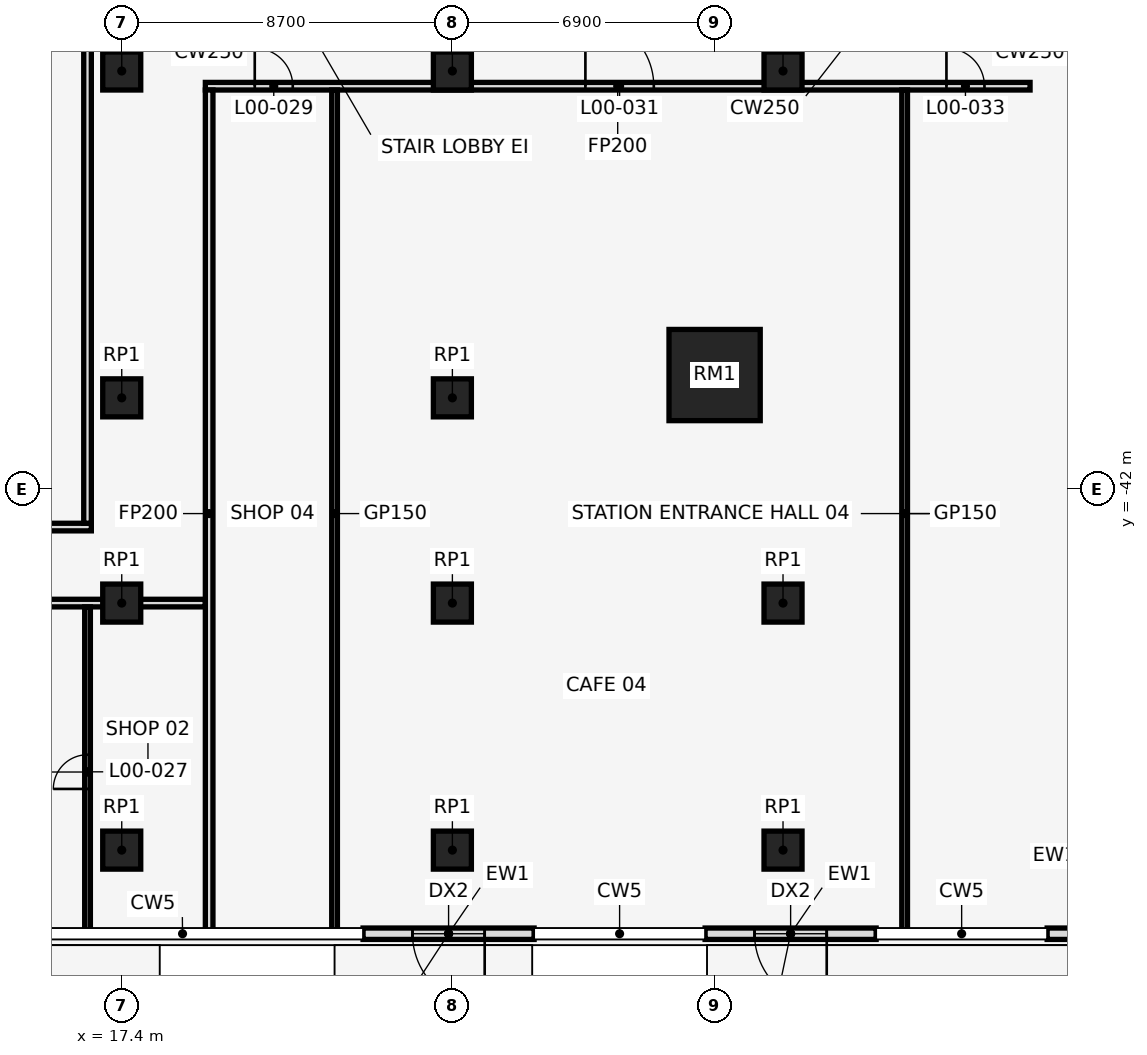
"""IFC4 building model, lengths in metres.
Left out: names, types, materials, properties, quantities, classifications, styles, units other than length and angle.
Written with IfcOpenShell. Run it as: python <this file> out.ifc"""

import sys

from ifc_helpers import new_model, si_unit, direction, frame, frame_2d, origin, origin_2d, place, context, subcontext, project, spatial, rectangle, extrude, element, fill, save


model = new_model("IFC4")
c1 = context("Model", 3, precision=1e-05, world=origin(), true_north=direction((0.0, 1.0)))
c2 = subcontext(c1, "Body", "Model", "MODEL_VIEW")
j1 = project(units=[si_unit("LENGTHUNIT", "METRE"), si_unit("PLANEANGLEUNIT", "RADIAN")], contexts=[c1])
p1 = place(None, origin())
s1 = spatial("IfcSite", under=j1, at=p1, CompositionType="ELEMENT")
p2 = place(p1, origin())
s2 = spatial("IfcBuilding", under=s1, at=p2, CompositionType="ELEMENT")
p3 = place(p2, origin())
s3 = spatial("IfcBuildingStorey", under=s2, at=p3, CompositionType="ELEMENT", Elevation=0.0)
for number, where, z_axis, x_axis in (
    (1, (17.4, -39.6, 0.0), (0.0, 0.0, 1.0), (1.0, 0.0, 0.0)),
    (2, (26.1, -39.6, 0.0), (0.0, 0.0, 1.0), (1.0, 0.0, 0.0)),
):
    element("IfcColumn", number, at=place(p3, frame(where, z_axis=z_axis, x_axis=x_axis)), inside=s3, PredefinedType="COLUMN", context=c2, shape_type="SweptSolid", body=[
        extrude(rectangle(XDim=1.0, YDim=1.0, at=origin_2d()), origin(), (0.0, 0.0, 1.0), 8.0),
    ])
p4 = place(p3, frame((33.0, -39.0, 0.0), z_axis=(0.0, 0.0, 1.0), x_axis=(1.0, 0.0, 0.0)))
e3 = element("IfcColumn", 3, at=p4, inside=s3, PredefinedType="COLUMN", context=c2, shape_type="SweptSolid", body=[
    extrude(rectangle(XDim=2.4, YDim=2.4, at=origin_2d()), origin(), (0.0, 0.0, 1.0), 8.0),
])
for number, where, z_axis, x_axis in (
    (4, (17.4, -31.0, 0.0), (0.0, 0.0, 1.0), (1.0, 0.0, 0.0)),
    (5, (17.4, -45.0, 0.0), (0.0, 0.0, 1.0), (1.0, 0.0, 0.0)),
    (6, (17.4, -51.5, 0.0), (0.0, 0.0, 1.0), (1.0, 0.0, 0.0)),
    (7, (26.1, -31.0, 0.0), (0.0, 0.0, 1.0), (1.0, 0.0, 0.0)),
    (8, (26.1, -45.0, 0.0), (0.0, 0.0, 1.0), (1.0, 0.0, 0.0)),
    (9, (26.1, -51.5, 0.0), (0.0, 0.0, 1.0), (1.0, 0.0, 0.0)),
    (10, (34.8, -31.0, 0.0), (0.0, 0.0, 1.0), (1.0, 0.0, 0.0)),
    (11, (34.8, -45.0, 0.0), (0.0, 0.0, 1.0), (1.0, 0.0, 0.0)),
    (12, (34.8, -51.5, 0.0), (0.0, 0.0, 1.0), (1.0, 0.0, 0.0)),
):
    element("IfcColumn", number, at=place(p3, frame(where, z_axis=z_axis, x_axis=x_axis)), inside=s3, PredefinedType="COLUMN", context=c2, shape_type="SweptSolid", body=[
        extrude(rectangle(XDim=1.0, YDim=1.0, at=origin_2d()), origin(), (0.0, 0.0, 1.0), 8.0),
    ])
p5 = place(p3, frame((28.25, -53.7, 0.0), z_axis=(0.0, 0.0, 1.0), x_axis=(-1.0, 0.0, 0.0)))
e13 = element("IfcWall", 13, at=p5, inside=s3, PredefinedType="STANDARD", context=c2, shape_type="SweptSolid", body=[
    extrude(rectangle(XDim=4.5, YDim=0.3, at=frame_2d((2.25, 0.0))), origin(), (0.0, 0.0, 1.0), 7.7),
])
p6 = place(p5, frame((1.3, 0.0, 0.0)))
e14 = element("IfcOpeningElement", 14, at=p6, cuts=e13, PredefinedType="OPENING", context=c2, shape_type="SweptSolid", body=[
    extrude(rectangle(XDim=1.9, YDim=2.6, at=frame_2d((0.95, 1.3))), frame((0.0, 0.162, 0.0), z_axis=(0.0, -1.0, 0.0), x_axis=(1.0, 0.0, 0.0)), (0.0, 0.0, 1.0), 0.324),
])
p7 = place(p5, frame((1.3, 0.0, 3.3)))
e15 = element("IfcOpeningElement", 15, at=p7, cuts=e13, PredefinedType="OPENING", context=c2, shape_type="SweptSolid", body=[
    extrude(rectangle(XDim=1.9, YDim=3.0, at=frame_2d((0.95, 1.5))), frame((0.0, 0.162, 0.0), z_axis=(0.0, -1.0, 0.0), x_axis=(1.0, 0.0, 0.0)), (0.0, 0.0, 1.0), 0.324),
])
p8 = place(p3, frame((37.25, -53.7, 0.0), z_axis=(0.0, 0.0, 1.0), x_axis=(-1.0, 0.0, 0.0)))
e16 = element("IfcWall", 16, at=p8, inside=s3, PredefinedType="STANDARD", context=c2, shape_type="SweptSolid", body=[
    extrude(rectangle(XDim=4.5, YDim=0.3, at=frame_2d((2.25, 0.0))), origin(), (0.0, 0.0, 1.0), 7.7),
])
p9 = place(p8, frame((1.3, 0.0, 0.0)))
e17 = element("IfcOpeningElement", 17, at=p9, cuts=e16, PredefinedType="OPENING", context=c2, shape_type="SweptSolid", body=[
    extrude(rectangle(XDim=1.9, YDim=2.6, at=frame_2d((0.95, 1.3))), frame((0.0, 0.162, 0.0), z_axis=(0.0, -1.0, 0.0), x_axis=(1.0, 0.0, 0.0)), (0.0, 0.0, 1.0), 0.324),
])
p10 = place(p8, frame((1.3, 0.0, 3.3)))
e18 = element("IfcOpeningElement", 18, at=p10, cuts=e16, PredefinedType="OPENING", context=c2, shape_type="SweptSolid", body=[
    extrude(rectangle(XDim=1.9, YDim=3.0, at=frame_2d((0.95, 1.5))), frame((0.0, 0.162, 0.0), z_axis=(0.0, -1.0, 0.0), x_axis=(1.0, 0.0, 0.0)), (0.0, 0.0, 1.0), 0.324),
])
p11 = place(p3, frame((46.25, -53.7, 0.0), z_axis=(0.0, 0.0, 1.0), x_axis=(-1.0, 0.0, 0.0)))
e19 = element("IfcWall", 19, at=p11, inside=s3, PredefinedType="STANDARD", context=c2, shape_type="SweptSolid", body=[
    extrude(rectangle(XDim=4.5, YDim=0.3, at=frame_2d((2.25, 0.0))), origin(), (0.0, 0.0, 1.0), 7.7),
])
p12 = place(p11, frame((1.3, 0.0, 0.0)))
e20 = element("IfcOpeningElement", 20, at=p12, cuts=e19, PredefinedType="OPENING", context=c2, shape_type="SweptSolid", body=[
    extrude(rectangle(XDim=1.9, YDim=2.6, at=frame_2d((0.95, 1.3))), frame((0.0, 0.162, 0.0), z_axis=(0.0, -1.0, 0.0), x_axis=(1.0, 0.0, 0.0)), (0.0, 0.0, 1.0), 0.324),
])
p13 = place(p11, frame((1.3, 0.0, 3.3)))
e21 = element("IfcOpeningElement", 21, at=p13, cuts=e19, PredefinedType="OPENING", context=c2, shape_type="SweptSolid", body=[
    extrude(rectangle(XDim=1.9, YDim=3.0, at=frame_2d((0.95, 1.5))), frame((0.0, 0.162, 0.0), z_axis=(0.0, -1.0, 0.0), x_axis=(1.0, 0.0, 0.0)), (0.0, 0.0, 1.0), 0.324),
])
p14 = place(p3, frame((-16.5, -45.0, 0.0), z_axis=(0.0, 0.0, 1.0), x_axis=(1.0, 0.0, 0.0)))
e22 = element("IfcWall", 22, at=p14, inside=s3, PredefinedType="PARTITIONING", context=c2, shape_type="SweptSolid", body=[
    extrude(rectangle(XDim=36.1, YDim=0.2, at=frame_2d((18.05, 0.0))), origin(), (0.0, 0.0, 1.0), 7.7),
])
p15 = place(p14, frame((3.0, 0.0, 0.0)))
e23 = element("IfcOpeningElement", 23, at=p15, cuts=e22, PredefinedType="OPENING", context=c2, shape_type="SweptSolid", body=[
    extrude(rectangle(XDim=1.0, YDim=2.1, at=frame_2d((0.5, 1.05))), frame((0.0, 0.112, 0.0), z_axis=(0.0, -1.0, 0.0), x_axis=(1.0, 0.0, 0.0)), (0.0, 0.0, 1.0), 0.224),
])
p16 = place(p3, frame((-16.6, -43.0, 0.0), z_axis=(0.0, 0.0, 1.0), x_axis=(1.0, 0.0, 0.0)))
e24 = element("IfcWall", 24, at=p16, inside=s3, PredefinedType="PARTITIONING", context=c2, shape_type="SweptSolid", body=[
    extrude(rectangle(XDim=33.2, YDim=0.2, at=frame_2d((16.6, 0.0))), origin(), (0.0, 0.0, 1.0), 7.7),
])
p17 = place(p3, frame((19.6, -31.4, 0.0), z_axis=(0.0, 0.0, 1.0), x_axis=(1.0, 0.0, 0.0)))
e25 = element("IfcWall", 25, at=p17, inside=s3, PredefinedType="PARTITIONING", context=c2, shape_type="SweptSolid", body=[
    extrude(rectangle(XDim=21.7, YDim=0.2, at=frame_2d((10.85, 0.0))), origin(), (0.0, 0.0, 1.0), 7.7),
])
p18 = place(p17, frame((1.3, 0.0, 0.0)))
e26 = element("IfcOpeningElement", 26, at=p18, cuts=e25, PredefinedType="OPENING", context=c2, shape_type="SweptSolid", body=[
    extrude(rectangle(XDim=1.0, YDim=2.1, at=frame_2d((0.5, 1.05))), frame((0.0, 0.112, 0.0), z_axis=(0.0, -1.0, 0.0), x_axis=(1.0, 0.0, 0.0)), (0.0, 0.0, 1.0), 0.224),
])
p19 = place(p17, frame((10.0, 0.0, 0.0)))
e27 = element("IfcOpeningElement", 27, at=p19, cuts=e25, PredefinedType="OPENING", context=c2, shape_type="SweptSolid", body=[
    extrude(rectangle(XDim=1.8, YDim=2.1, at=frame_2d((0.9, 1.05))), frame((0.0, 0.112, 0.0), z_axis=(0.0, -1.0, 0.0), x_axis=(1.0, 0.0, 0.0)), (0.0, 0.0, 1.0), 0.224),
])
p20 = place(p17, frame((19.5, 0.0, 0.0)))
e28 = element("IfcOpeningElement", 28, at=p20, cuts=e25, PredefinedType="OPENING", context=c2, shape_type="SweptSolid", body=[
    extrude(rectangle(XDim=1.0, YDim=2.1, at=frame_2d((0.5, 1.05))), frame((0.0, 0.112, 0.0), z_axis=(0.0, -1.0, 0.0), x_axis=(1.0, 0.0, 0.0)), (0.0, 0.0, 1.0), 0.224),
])
p21 = place(p3, frame((16.5, -53.79, 0.0), z_axis=(0.0, 0.0, 1.0), x_axis=(0.0, 1.0, 0.0)))
e29 = element("IfcWall", 29, at=p21, inside=s3, PredefinedType="PARTITIONING", context=c2, shape_type="SweptSolid", body=[
    extrude(rectangle(XDim=8.69, YDim=0.15, at=frame_2d((4.345, 0.0))), origin(), (0.0, 0.0, 1.0), 7.7),
])
p22 = place(p21, frame((3.9, 0.0, 0.0)))
e30 = element("IfcOpeningElement", 30, at=p22, cuts=e29, PredefinedType="OPENING", context=c2, shape_type="SweptSolid", body=[
    extrude(rectangle(XDim=0.9, YDim=2.1, at=frame_2d((0.45, 1.05))), frame((0.0, 0.087, 0.0), z_axis=(0.0, -1.0, 0.0), x_axis=(1.0, 0.0, 0.0)), (0.0, 0.0, 1.0), 0.174),
])
p23 = place(p3, frame((16.5, -42.9, 0.0), z_axis=(0.0, 0.0, 1.0), x_axis=(0.0, 1.0, 0.0)))
e31 = element("IfcWall", 31, at=p23, inside=s3, PredefinedType="PARTITIONING", context=c2, shape_type="SweptSolid", body=[
    extrude(rectangle(XDim=27.4, YDim=0.2, at=frame_2d((13.7, 0.0))), origin(), (0.0, 0.0, 1.0), 7.7),
])
p24 = place(p3, frame((19.7, -53.79, 0.0), z_axis=(0.0, 0.0, 1.0), x_axis=(0.0, 1.0, 0.0)))
e32 = element("IfcWall", 32, at=p24, inside=s3, PredefinedType="PARTITIONING", context=c2, shape_type="SweptSolid", body=[
    extrude(rectangle(XDim=22.29, YDim=0.2, at=frame_2d((11.145, 0.0))), origin(), (0.0, 0.0, 1.0), 7.7),
])
for number, where, z_axis, x_axis in (
    (33, (23.0, -53.79, 0.0), (0.0, 0.0, 1.0), (0.0, 1.0, 0.0)),
    (34, (38.0, -53.79, 0.0), (0.0, 0.0, 1.0), (0.0, 1.0, 0.0)),
):
    element("IfcWall", number, at=place(p3, frame(where, z_axis=z_axis, x_axis=x_axis)), inside=s3, PredefinedType="PARTITIONING", context=c2, shape_type="SweptSolid", body=[
        extrude(rectangle(XDim=22.29, YDim=0.15, at=frame_2d((11.145, 0.0))), origin(), (0.0, 0.0, 1.0), 7.7),
    ])
p25 = place(p6, origin())
e35 = element("IfcDoor", 35, at=p25, inside=s3, OperationType="SINGLE_SWING_LEFT", PredefinedType="DOOR", context=c2, shape_type="SweptSolid", body=[
    extrude(rectangle(XDim=1.9, YDim=2.6, at=frame_2d((0.95, 1.3))), frame((0.0, 0.025, 0.0), z_axis=(0.0, -1.0, 0.0), x_axis=(1.0, 0.0, 0.0)), (0.0, 0.0, 1.0), 0.05),
])
fill(e14, e35)
p26 = place(p7, origin())
e36 = element("IfcWindow", 36, at=p26, inside=s3, PartitioningType="SINGLE_PANEL", PredefinedType="WINDOW", context=c2, shape_type="SweptSolid", body=[
    extrude(rectangle(XDim=1.9, YDim=3.0, at=frame_2d((0.95, 1.5))), frame((0.0, 0.03, 0.0), z_axis=(0.0, -1.0, 0.0), x_axis=(1.0, 0.0, 0.0)), (0.0, 0.0, 1.0), 0.06),
])
fill(e15, e36)
p27 = place(p9, origin())
e37 = element("IfcDoor", 37, at=p27, inside=s3, OperationType="SINGLE_SWING_LEFT", PredefinedType="DOOR", context=c2, shape_type="SweptSolid", body=[
    extrude(rectangle(XDim=1.9, YDim=2.6, at=frame_2d((0.95, 1.3))), frame((0.0, 0.025, 0.0), z_axis=(0.0, -1.0, 0.0), x_axis=(1.0, 0.0, 0.0)), (0.0, 0.0, 1.0), 0.05),
])
fill(e17, e37)
p28 = place(p10, origin())
e38 = element("IfcWindow", 38, at=p28, inside=s3, PartitioningType="SINGLE_PANEL", PredefinedType="WINDOW", context=c2, shape_type="SweptSolid", body=[
    extrude(rectangle(XDim=1.9, YDim=3.0, at=frame_2d((0.95, 1.5))), frame((0.0, 0.03, 0.0), z_axis=(0.0, -1.0, 0.0), x_axis=(1.0, 0.0, 0.0)), (0.0, 0.0, 1.0), 0.06),
])
fill(e18, e38)
p29 = place(p22, frame((0.9, 0.0, 0.0), z_axis=(0.0, 0.0, 1.0), x_axis=(-1.0, 0.0, 0.0)))
e39 = element("IfcDoor", 39, at=p29, inside=s3, OperationType="SINGLE_SWING_RIGHT", PredefinedType="DOOR", context=c2, shape_type="SweptSolid", body=[
    extrude(rectangle(XDim=0.9, YDim=2.1, at=frame_2d((0.45, 1.05))), frame((0.0, 0.025, 0.0), z_axis=(0.0, -1.0, 0.0), x_axis=(1.0, 0.0, 0.0)), (0.0, 0.0, 1.0), 0.05),
])
fill(e30, e39)
p30 = place(p18, frame((1.0, 0.0, 0.0), z_axis=(0.0, 0.0, 1.0), x_axis=(-1.0, 0.0, 0.0)))
e40 = element("IfcDoor", 40, at=p30, inside=s3, OperationType="SINGLE_SWING_RIGHT", PredefinedType="DOOR", context=c2, shape_type="SweptSolid", body=[
    extrude(rectangle(XDim=1.0, YDim=2.1, at=frame_2d((0.5, 1.05))), frame((0.0, 0.025, 0.0), z_axis=(0.0, -1.0, 0.0), x_axis=(1.0, 0.0, 0.0)), (0.0, 0.0, 1.0), 0.05),
])
fill(e26, e40)
p31 = place(p19, origin())
e41 = element("IfcDoor", 41, at=p31, inside=s3, OperationType="SINGLE_SWING_LEFT", PredefinedType="DOOR", context=c2, shape_type="SweptSolid", body=[
    extrude(rectangle(XDim=1.8, YDim=2.1, at=frame_2d((0.9, 1.05))), frame((0.0, 0.025, 0.0), z_axis=(0.0, -1.0, 0.0), x_axis=(1.0, 0.0, 0.0)), (0.0, 0.0, 1.0), 0.05),
])
fill(e27, e41)
p32 = place(p20, frame((1.0, 0.0, 0.0), z_axis=(0.0, 0.0, 1.0), x_axis=(-1.0, 0.0, 0.0)))
e42 = element("IfcDoor", 42, at=p32, inside=s3, OperationType="SINGLE_SWING_RIGHT", PredefinedType="DOOR", context=c2, shape_type="SweptSolid", body=[
    extrude(rectangle(XDim=1.0, YDim=2.1, at=frame_2d((0.5, 1.05))), frame((0.0, 0.025, 0.0), z_axis=(0.0, -1.0, 0.0), x_axis=(1.0, 0.0, 0.0)), (0.0, 0.0, 1.0), 0.05),
])
fill(e28, e42)
save(model, sys.argv[1])
